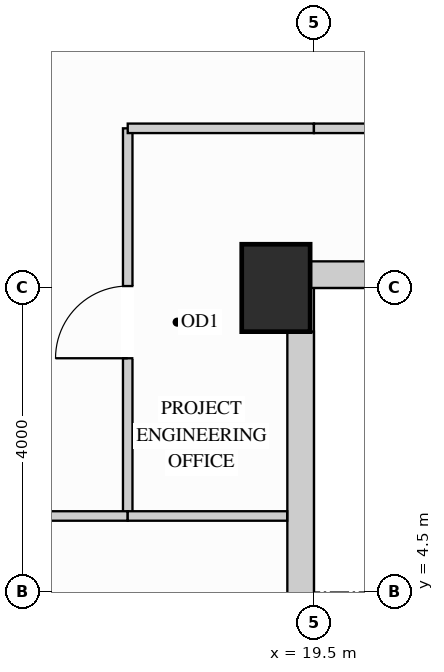
"""IFC4 building model, lengths in metres.
Left out: names, types, materials, properties, quantities, classifications, styles, units other than length and angle.
Written with IfcOpenShell. Run it as: python <this file> out.ifc"""

import sys

from ifc_helpers import new_model, si_unit, direction, frame, frame_2d, origin, origin_2d, place, context, subcontext, project, spatial, rectangle, extrude, source, transform, mapped, element, fill, save


model = new_model("IFC4")
c1 = context("Model", 3, precision=1e-05, world=origin(), true_north=direction((0.0, 1.0)))
c2 = subcontext(c1, "Body", "Model", "MODEL_VIEW")
j1 = project(units=[si_unit("LENGTHUNIT", "METRE"), si_unit("PLANEANGLEUNIT", "RADIAN")], contexts=[c1])
p1 = place(None, origin())
s1 = spatial("IfcSite", under=j1, at=p1, CompositionType="ELEMENT")
p2 = place(p1, origin())
s2 = spatial("IfcBuilding", under=s1, at=p2, CompositionType="ELEMENT")
p3 = place(p2, frame((0.0, 0.0, 106.2)))
s3 = spatial("IfcBuildingStorey", under=s2, at=p3, CompositionType="ELEMENT", Elevation=106.2)
m1 = source(origin(), c2, "Body", "SweptSolid", [
    extrude(rectangle(XDim=0.9, YDim=1.15, at=origin_2d()), origin(), (0.0, 0.0, 1.0), 3.38),
])
p4 = place(p3, frame((19.0, 8.5, 0.0), z_axis=(0.0, 0.0, 1.0), x_axis=(1.0, 0.0, 0.0)))
e1 = element("IfcColumn", 1, at=p4, inside=s3, PredefinedType="COLUMN", context=c2, shape_type="MappedRepresentation", body=[
    mapped(m1, transform((0.0, 0.0, 0.0), x_axis=(1.0, 0.0, 0.0), y_axis=(0.0, 1.0, 0.0), z_axis=(0.0, 0.0, 1.0))),
])
m2 = source(origin(), c2, "Body", "SweptSolid", [
    extrude(rectangle(XDim=3.854, YDim=0.35, at=frame_2d((1.927, 0.0))), origin(), (0.0, 0.0, 1.0), 2.519),
])
p5 = place(p3, frame((19.325, 4.073, 0.0), z_axis=(0.0, 0.0, 1.0), x_axis=(0.0, 1.0, 0.0)))
e2 = element("IfcWall", 2, at=p5, inside=s3, PredefinedType="SOLIDWALL", context=c2, shape_type="MappedRepresentation", body=[
    mapped(m2, transform((0.0, 0.0, 0.0), x_axis=(1.0, 0.0, 0.0), y_axis=(0.0, 1.0, 0.0), z_axis=(0.0, 0.0, 1.0))),
])
p6 = place(p3, frame((19.448, 8.675, 0.0), z_axis=(0.0, 0.0, 1.0), x_axis=(1.0, 0.0, 0.0)))
e3 = element("IfcWall", 3, at=p6, inside=s3, PredefinedType="SOLIDWALL", context=c2, shape_type="SweptSolid", body=[
    extrude(rectangle(XDim=3.504, YDim=0.35, at=frame_2d((1.752, 0.0))), origin(), (0.0, 0.0, 1.0), 3.365),
])
p7 = place(p6, frame((1.002, 0.0, 0.78)))
e4 = element("IfcOpeningElement", 4, at=p7, cuts=e3, PredefinedType="OPENING", context=c2, shape_type="SweptSolid", body=[
    extrude(rectangle(XDim=1.5, YDim=2.0, at=frame_2d((0.75, 1.0))), frame((0.0, 0.185, 0.0), z_axis=(0.0, -1.0, 0.0), x_axis=(1.0, 0.0, 0.0)), (0.0, 0.0, 1.0), 0.37),
])
p8 = place(p3, frame((17.05, 5.5, 0.0), z_axis=(0.0, 0.0, 1.0), x_axis=(0.0, 1.0, 0.0)))
e5 = element("IfcWall", 5, at=p8, inside=s3, PredefinedType="PARTITIONING", context=c2, shape_type="SweptSolid", body=[
    extrude(rectangle(XDim=5.1, YDim=0.125, at=frame_2d((2.55, 0.0))), origin(), (0.0, 0.0, 1.0), 3.365),
])
p9 = place(p8, frame((2.075, 0.0, 0.0)))
e6 = element("IfcOpeningElement", 6, at=p9, cuts=e5, PredefinedType="OPENING", context=c2, shape_type="SweptSolid", body=[
    extrude(rectangle(XDim=0.95, YDim=2.15, at=frame_2d((0.475, 1.075))), frame((0.0, 0.073, 0.0), z_axis=(0.0, -1.0, 0.0), x_axis=(1.0, 0.0, 0.0)), (0.0, 0.0, 1.0), 0.145),
])
m3 = source(origin(), c2, "Body", "SweptSolid", [
    extrude(rectangle(XDim=2.45, YDim=0.125, at=frame_2d((1.225, 0.0))), origin(), (0.0, 0.0, 1.0), 3.365),
])
p10 = place(p3, frame((17.05, 10.6, 0.0), z_axis=(0.0, 0.0, 1.0), x_axis=(1.0, 0.0, 0.0)))
e7 = element("IfcWall", 7, at=p10, inside=s3, PredefinedType="PARTITIONING", context=c2, shape_type="MappedRepresentation", body=[
    mapped(m3, transform((0.0, 0.0, 0.0), x_axis=(1.0, 0.0, 0.0), y_axis=(0.0, 1.0, 0.0), z_axis=(0.0, 0.0, 1.0))),
])
p11 = place(p3, frame((19.5, 10.6, 0.0), z_axis=(0.0, 0.0, 1.0), x_axis=(1.0, 0.0, 0.0)))
e8 = element("IfcWall", 8, at=p11, inside=s3, PredefinedType="PARTITIONING", context=c2, shape_type="SweptSolid", body=[
    extrude(rectangle(XDim=14.9, YDim=0.125, at=frame_2d((7.45, 0.0))), origin(), (0.0, 0.0, 1.0), 3.365),
])
p12 = place(p11, frame((6.975, 0.0, 0.0)))
e9 = element("IfcOpeningElement", 9, at=p12, cuts=e8, PredefinedType="OPENING", context=c2, shape_type="SweptSolid", body=[
    extrude(rectangle(XDim=0.95, YDim=2.15, at=frame_2d((0.475, 1.075))), frame((0.0, 0.073, 0.0), z_axis=(0.0, -1.0, 0.0), x_axis=(1.0, 0.0, 0.0)), (0.0, 0.0, 1.0), 0.145),
])
p13 = place(p3, frame((13.357, 5.5, 0.0), z_axis=(0.0, 0.0, 1.0), x_axis=(1.0, 0.0, 0.0)))
e10 = element("IfcWall", 10, at=p13, inside=s3, PredefinedType="PARTITIONING", context=c2, shape_type="SweptSolid", body=[
    extrude(rectangle(XDim=3.693, YDim=0.125, at=frame_2d((1.847, 0.0))), origin(), (0.0, 0.0, 1.0), 3.365),
])
p14 = place(p13, frame((1.372, 0.0, 0.0)))
e11 = element("IfcOpeningElement", 11, at=p14, cuts=e10, PredefinedType="OPENING", context=c2, shape_type="SweptSolid", body=[
    extrude(rectangle(XDim=0.95, YDim=2.15, at=frame_2d((0.475, 1.075))), frame((0.0, 0.073, 0.0), z_axis=(0.0, -1.0, 0.0), x_axis=(1.0, 0.0, 0.0)), (0.0, 0.0, 1.0), 0.145),
])
m4 = source(origin(), c2, "Body", "SweptSolid", [
    extrude(rectangle(XDim=2.098, YDim=0.125, at=frame_2d((1.049, 0.0))), origin(), (0.0, 0.0, 1.0), 3.365),
])
p15 = place(p3, frame((17.05, 5.5, 0.0), z_axis=(0.0, 0.0, 1.0), x_axis=(1.0, 0.0, 0.0)))
e12 = element("IfcWall", 12, at=p15, inside=s3, PredefinedType="PARTITIONING", context=c2, shape_type="MappedRepresentation", body=[
    mapped(m4, transform((0.0, 0.0, 0.0), x_axis=(1.0, 0.0, 0.0), y_axis=(0.0, 1.0, 0.0), z_axis=(0.0, 0.0, 1.0))),
])
m5 = source(origin(), c2, "Body", "SweptSolid", [
    extrude(rectangle(XDim=0.95, YDim=2.15, at=frame_2d((0.475, 1.075))), frame((0.0, 0.025, 0.0), z_axis=(0.0, -1.0, 0.0), x_axis=(1.0, 0.0, 0.0)), (0.0, 0.0, 1.0), 0.05),
])
p16 = place(p9, origin())
e13 = element("IfcDoor", 13, at=p16, inside=s3, OperationType="SINGLE_SWING_LEFT", PredefinedType="DOOR", context=c2, shape_type="MappedRepresentation", body=[
    mapped(m5, transform((0.0, 0.0, 0.0), x_axis=(1.0, 0.0, 0.0), y_axis=(0.0, 1.0, 0.0), z_axis=(0.0, 0.0, 1.0))),
])
fill(e6, e13)
save(model, sys.argv[1])
